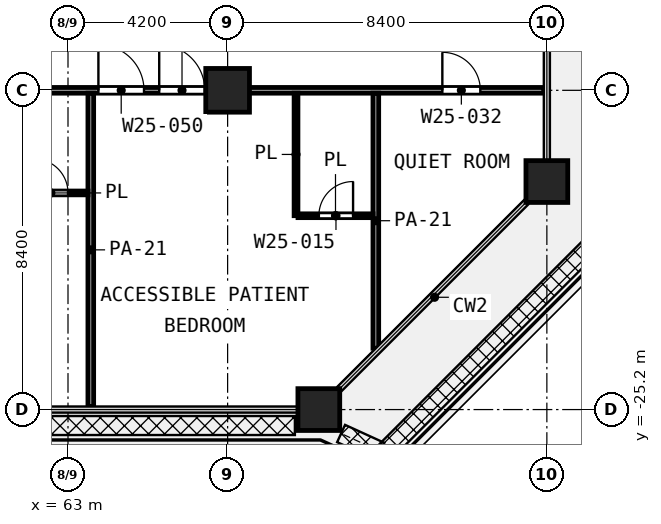
"""IFC4 building model, lengths in metres.
Left out: names, types, materials, properties, quantities, classifications, styles, units other than length and angle.
Written with IfcOpenShell. Run it as: python <this file> out.ifc"""

import sys

from ifc_helpers import new_model, si_unit, direction, frame, frame_2d, origin, origin_2d, place, context, subcontext, project, spatial, rectangle, extrude, element, fill, save


model = new_model("IFC4")
c1 = context("Model", 3, precision=1e-05, world=origin(), true_north=direction((0.0, 1.0)))
c2 = subcontext(c1, "Body", "Model", "MODEL_VIEW")
j1 = project(units=[si_unit("LENGTHUNIT", "METRE"), si_unit("PLANEANGLEUNIT", "RADIAN")], contexts=[c1])
p1 = place(None, origin())
s1 = spatial("IfcSite", under=j1, at=p1, CompositionType="ELEMENT")
p2 = place(p1, origin())
s2 = spatial("IfcBuilding", under=s1, at=p2, CompositionType="ELEMENT")
p3 = place(p2, frame((0.0, 0.0, 132.4)))
s3 = spatial("IfcBuildingStorey", under=s2, at=p3, CompositionType="ELEMENT", Elevation=132.4)
p4 = place(p3, frame((67.2, -16.8, 0.0), z_axis=(0.0, 0.0, 1.0), x_axis=(1.0, 0.0, 0.0)))
e1 = element("IfcColumn", 1, at=p4, inside=s3, PredefinedType="COLUMN", context=c2, shape_type="SweptSolid", body=[
    extrude(rectangle(XDim=1.15, YDim=1.15, at=origin_2d()), origin(), (0.0, 0.0, 1.0), 4.2),
])
for number, where, z_axis, x_axis in (
    (2, (75.6, -19.2, 0.0), (0.0, 0.0, 1.0), (1.0, 0.0, 0.0)),
    (3, (69.6, -25.2, 0.0), (0.0, 0.0, 1.0), (1.0, 0.0, 0.0)),
):
    element("IfcColumn", number, at=place(p3, frame(where, z_axis=z_axis, x_axis=x_axis)), inside=s3, PredefinedType="COLUMN", context=c2, shape_type="SweptSolid", body=[
        extrude(rectangle(XDim=1.1, YDim=1.1, at=origin_2d()), origin(), (0.0, 0.0, 1.0), 4.2),
    ])
p5 = place(p3, frame((69.052, -20.1, 0.0), z_axis=(0.0, 0.0, 1.0), x_axis=(1.0, 0.0, 0.0)))
e4 = element("IfcWall", 4, at=p5, inside=s3, PredefinedType="PARTITIONING", context=c2, shape_type="SweptSolid", body=[
    extrude(rectangle(XDim=1.973, YDim=0.1, at=frame_2d((0.986, 0.0))), origin(), (0.0, 0.0, 1.0), 3.6),
])
p6 = place(p5, frame((0.549, 0.0, 0.0)))
e5 = element("IfcOpeningElement", 5, at=p6, cuts=e4, PredefinedType="OPENING", context=c2, shape_type="SweptSolid", body=[
    extrude(rectangle(XDim=0.9, YDim=2.1, at=frame_2d((0.45, 1.05))), frame((0.0, 0.06, 0.0), z_axis=(0.0, -1.0, 0.0), x_axis=(1.0, 0.0, 0.0)), (0.0, 0.0, 1.0), 0.12),
])
p7 = place(p3, frame((61.55, -19.5, 0.0), z_axis=(0.0, 0.0, 1.0), x_axis=(1.0, 0.0, 0.0)))
e6 = element("IfcWall", 6, at=p7, inside=s3, PredefinedType="PARTITIONING", context=c2, shape_type="SweptSolid", body=[
    extrude(rectangle(XDim=1.975, YDim=0.1, at=frame_2d((0.987, 0.0))), origin(), (0.0, 0.0, 1.0), 3.6),
])
p8 = place(p7, frame((0.55, 0.0, 0.0)))
e7 = element("IfcOpeningElement", 7, at=p8, cuts=e6, PredefinedType="OPENING", context=c2, shape_type="SweptSolid", body=[
    extrude(rectangle(XDim=0.9, YDim=2.1, at=frame_2d((0.45, 1.05))), frame((0.0, 0.06, 0.0), z_axis=(0.0, -1.0, 0.0), x_axis=(1.0, 0.0, 0.0)), (0.0, 0.0, 1.0), 0.12),
])
p9 = place(p3, frame((69.0, -20.099, 0.0), z_axis=(0.0, 0.0, 1.0), x_axis=(0.0, 1.0, 0.0)))
e8 = element("IfcWall", 8, at=p9, inside=s3, PredefinedType="PARTITIONING", context=c2, shape_type="SweptSolid", body=[
    extrude(rectangle(XDim=3.224, YDim=0.1, at=frame_2d((1.612, 0.0))), origin(), (0.0, 0.0, 1.0), 3.6),
])
p10 = place(p3, frame((25.0, -16.8, 0.0), z_axis=(0.0, 0.0, 1.0), x_axis=(1.0, 0.0, 0.0)))
e9 = element("IfcWall", 9, at=p10, inside=s3, PredefinedType="PARTITIONING", context=c2, shape_type="SweptSolid", body=[
    extrude(rectangle(XDim=50.52, YDim=0.15, at=frame_2d((25.26, 0.0))), origin(), (0.0, 0.0, 1.0), 3.6),
])
p11 = place(p10, frame((1.55, 0.0, 0.0)))
e10 = element("IfcOpeningElement", 10, at=p11, cuts=e9, PredefinedType="OPENING", context=c2, shape_type="SweptSolid", body=[
    extrude(rectangle(XDim=1.5, YDim=2.1, at=frame_2d((0.75, 1.05))), frame((0.0, 0.085, 0.0), z_axis=(0.0, -1.0, 0.0), x_axis=(1.0, 0.0, 0.0)), (0.0, 0.0, 1.0), 0.17),
])
p12 = place(p10, frame((6.0, 0.0, 0.0)))
e11 = element("IfcOpeningElement", 11, at=p12, cuts=e9, PredefinedType="OPENING", context=c2, shape_type="SweptSolid", body=[
    extrude(rectangle(XDim=1.0, YDim=2.1, at=frame_2d((0.5, 1.05))), frame((0.0, 0.085, 0.0), z_axis=(0.0, -1.0, 0.0), x_axis=(1.0, 0.0, 0.0)), (0.0, 0.0, 1.0), 0.17),
])
p13 = place(p10, frame((9.6, 0.0, 0.0)))
e12 = element("IfcOpeningElement", 12, at=p13, cuts=e9, PredefinedType="OPENING", context=c2, shape_type="SweptSolid", body=[
    extrude(rectangle(XDim=1.2, YDim=2.1, at=frame_2d((0.6, 1.05))), frame((0.0, 0.085, 0.0), z_axis=(0.0, -1.0, 0.0), x_axis=(1.0, 0.0, 0.0)), (0.0, 0.0, 1.0), 0.17),
])
p14 = place(p10, frame((18.2, 0.0, 0.0)))
e13 = element("IfcOpeningElement", 13, at=p14, cuts=e9, PredefinedType="OPENING", context=c2, shape_type="SweptSolid", body=[
    extrude(rectangle(XDim=1.2, YDim=2.1, at=frame_2d((0.6, 1.05))), frame((0.0, 0.085, 0.0), z_axis=(0.0, -1.0, 0.0), x_axis=(1.0, 0.0, 0.0)), (0.0, 0.0, 1.0), 0.17),
])
p15 = place(p10, frame((15.45, 0.0, 0.0)))
e14 = element("IfcOpeningElement", 14, at=p15, cuts=e9, PredefinedType="OPENING", context=c2, shape_type="SweptSolid", body=[
    extrude(rectangle(XDim=0.9, YDim=2.1, at=frame_2d((0.45, 1.05))), frame((0.0, 0.085, 0.0), z_axis=(0.0, -1.0, 0.0), x_axis=(1.0, 0.0, 0.0)), (0.0, 0.0, 1.0), 0.17),
])
p16 = place(p10, frame((23.6, 0.0, 0.0)))
e15 = element("IfcOpeningElement", 15, at=p16, cuts=e9, PredefinedType="OPENING", context=c2, shape_type="SweptSolid", body=[
    extrude(rectangle(XDim=1.2, YDim=2.1, at=frame_2d((0.6, 1.05))), frame((0.0, 0.085, 0.0), z_axis=(0.0, -1.0, 0.0), x_axis=(1.0, 0.0, 0.0)), (0.0, 0.0, 1.0), 0.17),
])
p17 = place(p10, frame((26.1, 0.0, 0.0)))
e16 = element("IfcOpeningElement", 16, at=p17, cuts=e9, PredefinedType="OPENING", context=c2, shape_type="SweptSolid", body=[
    extrude(rectangle(XDim=1.2, YDim=2.1, at=frame_2d((0.6, 1.05))), frame((0.0, 0.085, 0.0), z_axis=(0.0, -1.0, 0.0), x_axis=(1.0, 0.0, 0.0)), (0.0, 0.0, 1.0), 0.17),
])
p18 = place(p10, frame((32.0, 0.0, 0.0)))
e17 = element("IfcOpeningElement", 17, at=p18, cuts=e9, PredefinedType="OPENING", context=c2, shape_type="SweptSolid", body=[
    extrude(rectangle(XDim=1.2, YDim=2.1, at=frame_2d((0.6, 1.05))), frame((0.0, 0.085, 0.0), z_axis=(0.0, -1.0, 0.0), x_axis=(1.0, 0.0, 0.0)), (0.0, 0.0, 1.0), 0.17),
])
p19 = place(p10, frame((35.0, 0.0, 0.0)))
e18 = element("IfcOpeningElement", 18, at=p19, cuts=e9, PredefinedType="OPENING", context=c2, shape_type="SweptSolid", body=[
    extrude(rectangle(XDim=1.2, YDim=2.1, at=frame_2d((0.6, 1.05))), frame((0.0, 0.085, 0.0), z_axis=(0.0, -1.0, 0.0), x_axis=(1.0, 0.0, 0.0)), (0.0, 0.0, 1.0), 0.17),
])
p20 = place(p10, frame((40.4, 0.0, 0.0)))
e19 = element("IfcOpeningElement", 19, at=p20, cuts=e9, PredefinedType="OPENING", context=c2, shape_type="SweptSolid", body=[
    extrude(rectangle(XDim=1.2, YDim=2.1, at=frame_2d((0.6, 1.05))), frame((0.0, 0.085, 0.0), z_axis=(0.0, -1.0, 0.0), x_axis=(1.0, 0.0, 0.0)), (0.0, 0.0, 1.0), 0.17),
])
p21 = place(p10, frame((38.8, 0.0, 0.0)))
e20 = element("IfcOpeningElement", 20, at=p21, cuts=e9, PredefinedType="OPENING", context=c2, shape_type="SweptSolid", body=[
    extrude(rectangle(XDim=1.2, YDim=2.1, at=frame_2d((0.6, 1.05))), frame((0.0, 0.085, 0.0), z_axis=(0.0, -1.0, 0.0), x_axis=(1.0, 0.0, 0.0)), (0.0, 0.0, 1.0), 0.17),
])
p22 = place(p10, frame((47.85, 0.0, 0.0)))
e21 = element("IfcOpeningElement", 21, at=p22, cuts=e9, PredefinedType="OPENING", context=c2, shape_type="SweptSolid", body=[
    extrude(rectangle(XDim=1.0, YDim=2.1, at=frame_2d((0.5, 1.05))), frame((0.0, 0.085, 0.0), z_axis=(0.0, -1.0, 0.0), x_axis=(1.0, 0.0, 0.0)), (0.0, 0.0, 1.0), 0.17),
])
p23 = place(p3, frame((63.6, -25.12, 0.0), z_axis=(0.0, 0.0, 1.0), x_axis=(0.0, 1.0, 0.0)))
e22 = element("IfcWall", 22, at=p23, inside=s3, PredefinedType="PARTITIONING", context=c2, shape_type="SweptSolid", body=[
    extrude(rectangle(XDim=8.245, YDim=0.15, at=frame_2d((4.123, 0.0))), origin(), (0.0, 0.0, 1.0), 2.7),
])
p24 = place(p3, frame((71.1, -23.587, 0.0), z_axis=(0.0, 0.0, 1.0), x_axis=(0.0, 1.0, 0.0)))
e23 = element("IfcWall", 23, at=p24, inside=s3, PredefinedType="PARTITIONING", context=c2, shape_type="SweptSolid", body=[
    extrude(rectangle(XDim=6.712, YDim=0.15, at=frame_2d((3.356, 0.0))), origin(), (0.0, 0.0, 1.0), 2.7),
])
p25 = place(p8, origin())
e24 = element("IfcDoor", 24, at=p25, inside=s3, OperationType="SINGLE_SWING_LEFT", PredefinedType="DOOR", context=c2, shape_type="SweptSolid", body=[
    extrude(rectangle(XDim=0.9, YDim=2.1, at=frame_2d((0.45, 1.05))), frame((0.0, 0.025, 0.0), z_axis=(0.0, -1.0, 0.0), x_axis=(1.0, 0.0, 0.0)), (0.0, 0.0, 1.0), 0.05),
])
fill(e7, e24)
p26 = place(p20, origin())
e25 = element("IfcDoor", 25, at=p26, inside=s3, OperationType="SINGLE_SWING_LEFT", PredefinedType="DOOR", context=c2, shape_type="SweptSolid", body=[
    extrude(rectangle(XDim=1.2, YDim=2.1, at=frame_2d((0.6, 1.05))), frame((0.0, 0.025, 0.0), z_axis=(0.0, -1.0, 0.0), x_axis=(1.0, 0.0, 0.0)), (0.0, 0.0, 1.0), 0.05),
])
fill(e19, e25)
p27 = place(p21, origin())
e26 = element("IfcDoor", 26, at=p27, inside=s3, OperationType="SINGLE_SWING_LEFT", PredefinedType="DOOR", context=c2, shape_type="SweptSolid", body=[
    extrude(rectangle(XDim=1.2, YDim=2.1, at=frame_2d((0.6, 1.05))), frame((0.0, 0.025, 0.0), z_axis=(0.0, -1.0, 0.0), x_axis=(1.0, 0.0, 0.0)), (0.0, 0.0, 1.0), 0.05),
])
fill(e20, e26)
p28 = place(p6, origin())
e27 = element("IfcDoor", 27, at=p28, inside=s3, OperationType="SINGLE_SWING_RIGHT", PredefinedType="DOOR", context=c2, shape_type="SweptSolid", body=[
    extrude(rectangle(XDim=0.9, YDim=2.1, at=frame_2d((0.45, 1.05))), frame((0.0, 0.025, 0.0), z_axis=(0.0, -1.0, 0.0), x_axis=(1.0, 0.0, 0.0)), (0.0, 0.0, 1.0), 0.05),
])
fill(e5, e27)
p29 = place(p22, origin())
e28 = element("IfcDoor", 28, at=p29, inside=s3, OperationType="SINGLE_SWING_LEFT", PredefinedType="DOOR", context=c2, shape_type="SweptSolid", body=[
    extrude(rectangle(XDim=1.0, YDim=2.1, at=frame_2d((0.5, 1.05))), frame((0.0, 0.025, 0.0), z_axis=(0.0, -1.0, 0.0), x_axis=(1.0, 0.0, 0.0)), (0.0, 0.0, 1.0), 0.05),
])
fill(e21, e28)
save(model, sys.argv[1])
